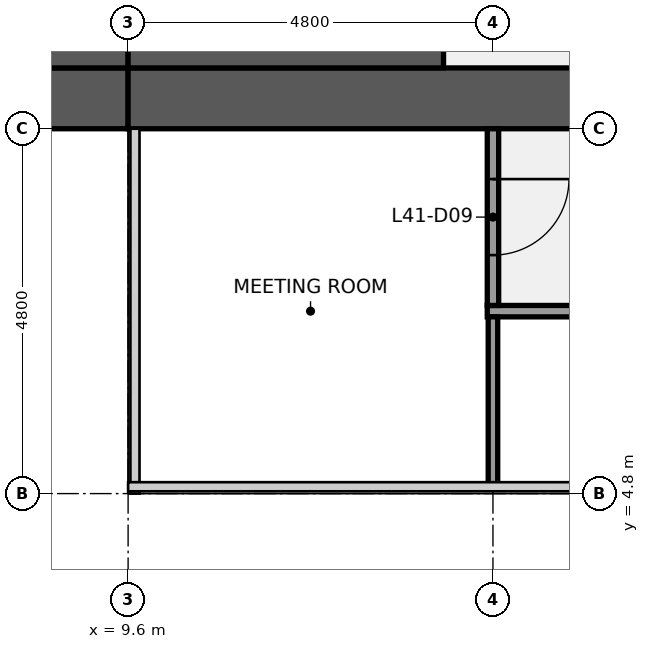
"""IFC4 building model, lengths in metres.
Left out: names, types, materials, properties, quantities, classifications, styles, units other than length and angle.
Written with IfcOpenShell. Run it as: python <this file> out.ifc"""

import sys

from ifc_helpers import new_model, si_unit, direction, frame, frame_2d, origin, place, context, subcontext, project, spatial, rectangle, extrude, element, fill, save


model = new_model("IFC4")
c1 = context("Model", 3, precision=1e-05, world=origin(), true_north=direction((0.0, 1.0)))
c2 = subcontext(c1, "Body", "Model", "MODEL_VIEW")
j1 = project(units=[si_unit("LENGTHUNIT", "METRE"), si_unit("PLANEANGLEUNIT", "RADIAN")], contexts=[c1])
p1 = place(None, origin())
s1 = spatial("IfcSite", under=j1, at=p1, CompositionType="ELEMENT")
p2 = place(p1, origin())
s2 = spatial("IfcBuilding", under=s1, at=p2, CompositionType="ELEMENT")
p3 = place(p2, frame((0.0, 0.0, 193.2)))
s3 = spatial("IfcBuildingStorey", under=s2, at=p3, CompositionType="ELEMENT", Elevation=193.2)
p4 = place(p3, frame((9.6, 10.0, 0.0), z_axis=(0.0, 0.0, 1.0), x_axis=(-1.0, 0.0, 0.0)))
e1 = element("IfcWall", 1, at=p4, inside=s3, PredefinedType="SHEAR", context=c2, shape_type="SweptSolid", body=[
    extrude(rectangle(XDim=8.8, YDim=0.8, at=frame_2d((4.4, 0.0))), origin(), (0.0, 0.0, 1.0), 3.84),
])
p5 = place(p4, frame((1.5, 0.0, 0.9)))
e2 = element("IfcOpeningElement", 2, at=p5, cuts=e1, PredefinedType="OPENING", context=c2, shape_type="SweptSolid", body=[
    extrude(rectangle(XDim=1.8, YDim=1.5, at=frame_2d((0.9, 0.75))), frame((0.0, 0.41, 0.0), z_axis=(0.0, -1.0, 0.0), x_axis=(1.0, 0.0, 0.0)), (0.0, 0.0, 1.0), 0.82),
])
p6 = place(p3, frame((18.4, 10.0, 0.0), z_axis=(0.0, 0.0, 1.0), x_axis=(-1.0, 0.0, 0.0)))
e3 = element("IfcWall", 3, at=p6, inside=s3, PredefinedType="SHEAR", context=c2, shape_type="SweptSolid", body=[
    extrude(rectangle(XDim=8.8, YDim=0.8, at=frame_2d((4.4, 0.0))), origin(), (0.0, 0.0, 1.0), 3.84),
])
p7 = place(p6, frame((1.05, 0.0, 0.0)))
e4 = element("IfcOpeningElement", 4, at=p7, cuts=e3, PredefinedType="OPENING", context=c2, shape_type="SweptSolid", body=[
    extrude(rectangle(XDim=1.1, YDim=2.1, at=frame_2d((0.55, 1.05))), frame((0.0, 0.41, 0.0), z_axis=(0.0, -1.0, 0.0), x_axis=(1.0, 0.0, 0.0)), (0.0, 0.0, 1.0), 0.82),
])
p8 = place(p3, frame((6.25, 10.6, 0.0), z_axis=(0.0, 0.0, 1.0), x_axis=(1.0, 0.0, 0.0)))
e5 = element("IfcWall", 5, at=p8, inside=s3, PredefinedType="SHEAR", context=c2, shape_type="SweptSolid", body=[
    extrude(rectangle(XDim=3.35, YDim=0.4, at=frame_2d((1.675, 0.0))), origin(), (0.0, 0.0, 1.0), 3.84),
])
p9 = place(p3, frame((9.6, 10.6, 0.0), z_axis=(0.0, 0.0, 1.0), x_axis=(1.0, 0.0, 0.0)))
e6 = element("IfcWall", 6, at=p9, inside=s3, PredefinedType="SHEAR", context=c2, shape_type="SweptSolid", body=[
    extrude(rectangle(XDim=4.15, YDim=0.4, at=frame_2d((2.075, 0.0))), origin(), (0.0, 0.0, 1.0), 3.84),
])
p10 = place(p3, frame((14.325, 7.2, 0.0), z_axis=(0.0, 0.0, 1.0), x_axis=(1.0, 0.0, 0.0)))
e7 = element("IfcWall", 7, at=p10, inside=s3, PredefinedType="PARTITIONING", context=c2, shape_type="SweptSolid", body=[
    extrude(rectangle(XDim=4.95, YDim=0.15, at=frame_2d((2.475, 0.0))), origin(), (0.0, 0.0, 1.0), 2.849),
])
p11 = place(p10, frame((1.975, 0.0, 0.0)))
e8 = element("IfcOpeningElement", 8, at=p11, cuts=e7, PredefinedType="OPENING", context=c2, shape_type="SweptSolid", body=[
    extrude(rectangle(XDim=1.0, YDim=2.1, at=frame_2d((0.5, 1.05))), frame((0.0, 0.085, 0.0), z_axis=(0.0, -1.0, 0.0), x_axis=(1.0, 0.0, 0.0)), (0.0, 0.0, 1.0), 0.17),
])
p12 = place(p3, frame((14.4, 4.9, 0.0), z_axis=(0.0, 0.0, 1.0), x_axis=(0.0, 1.0, 0.0)))
e9 = element("IfcWall", 9, at=p12, inside=s3, PredefinedType="PARTITIONING", context=c2, shape_type="SweptSolid", body=[
    extrude(rectangle(XDim=2.225, YDim=0.125, at=frame_2d((1.113, 0.0))), origin(), (0.0, 0.0, 1.0), 2.849),
])
p13 = place(p3, frame((14.4, 7.275, 0.0), z_axis=(0.0, 0.0, 1.0), x_axis=(0.0, 1.0, 0.0)))
e10 = element("IfcWall", 10, at=p13, inside=s3, PredefinedType="PARTITIONING", context=c2, shape_type="SweptSolid", body=[
    extrude(rectangle(XDim=2.325, YDim=0.15, at=frame_2d((1.163, 0.0))), origin(), (0.0, 0.0, 1.0), 2.849),
])
p14 = place(p13, frame((0.663, 0.0, 0.0)))
e11 = element("IfcOpeningElement", 11, at=p14, cuts=e10, PredefinedType="OPENING", context=c2, shape_type="SweptSolid", body=[
    extrude(rectangle(XDim=1.0, YDim=2.1, at=frame_2d((0.5, 1.05))), frame((0.0, 0.085, 0.0), z_axis=(0.0, -1.0, 0.0), x_axis=(1.0, 0.0, 0.0)), (0.0, 0.0, 1.0), 0.17),
])
p15 = place(p14, origin())
e12 = element("IfcDoor", 12, at=p15, inside=s3, OperationType="SINGLE_SWING_RIGHT", PredefinedType="DOOR", context=c2, shape_type="SweptSolid", body=[
    extrude(rectangle(XDim=1.0, YDim=2.1, at=frame_2d((0.5, 1.05))), frame((0.0, 0.025, 0.0), z_axis=(0.0, -1.0, 0.0), x_axis=(1.0, 0.0, 0.0)), (0.0, 0.0, 1.0), 0.05),
])
fill(e11, e12)
save(model, sys.argv[1])
